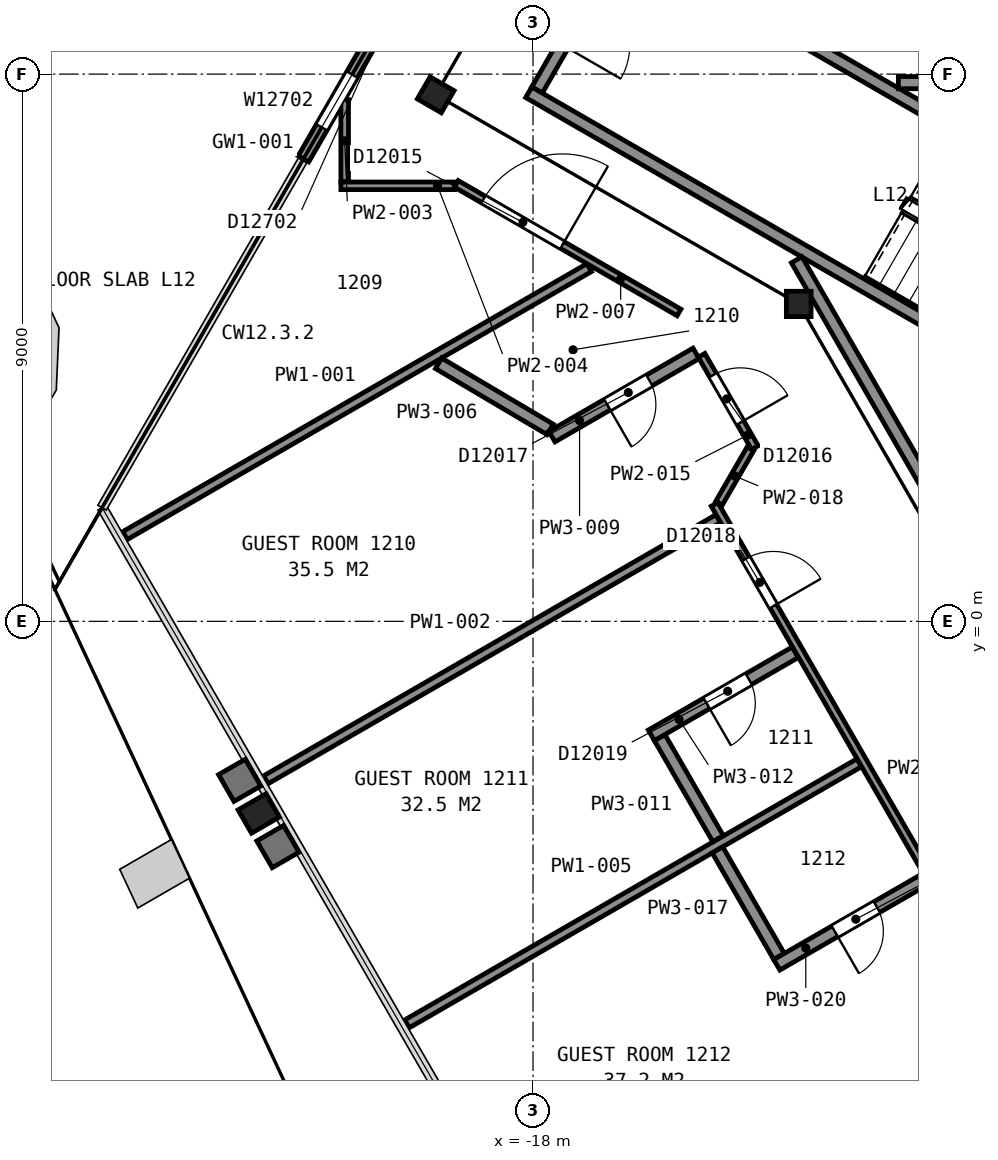
"""IFC4 building model, lengths in metres.
Left out: names, types, materials, properties, quantities, classifications, styles, units other than length and angle.
Written with IfcOpenShell. Run it as: python <this file> out.ifc"""

import sys

from ifc_helpers import new_model, si_unit, direction, frame, frame_2d, origin, origin_2d, place, context, subcontext, project, spatial, rectangle, i_section, extrude, element, fill, save


model = new_model("IFC4")
c1 = context("Model", 3, precision=1e-05, world=origin(), true_north=direction((0.0, 1.0)))
c2 = subcontext(c1, "Body", "Model", "MODEL_VIEW")
j1 = project(units=[si_unit("LENGTHUNIT", "METRE"), si_unit("PLANEANGLEUNIT", "RADIAN")], contexts=[c1])
p1 = place(None, origin())
s1 = spatial("IfcSite", under=j1, at=p1, CompositionType="ELEMENT")
p2 = place(p1, origin())
s2 = spatial("IfcBuilding", under=s1, at=p2, CompositionType="ELEMENT")
p3 = place(p2, frame((0.0, 0.0, 58.4)))
s3 = spatial("IfcBuildingStorey", under=s2, at=p3, CompositionType="ELEMENT", Elevation=58.4)
p4 = place(p3, frame((-22.51, -3.16, 0.0), z_axis=(0.0, 0.0, 1.0), x_axis=(-0.5, 0.866025403784, 0.0)))
e1 = element("IfcColumn", 1, at=p4, inside=s3, PredefinedType="COLUMN", context=c2, shape_type="SweptSolid", body=[
    extrude(i_section(OverallWidth=0.442, OverallDepth=0.531, WebThickness=0.066, FlangeThickness=0.106, FilletRadius=0.015, at=origin_2d()), origin(), (0.0, 0.0, 1.0), 3.575),
])
p5 = place(p3, frame((-19.6, 8.66, 0.0), z_axis=(0.0, 0.0, 1.0), x_axis=(0.5, 0.866025403784, 0.0)))
e2 = element("IfcColumn", 2, at=p5, inside=s3, PredefinedType="COLUMN", context=c2, shape_type="SweptSolid", body=[
    extrude(i_section(OverallWidth=0.419, OverallDepth=0.455, WebThickness=0.042, FlangeThickness=0.068, FilletRadius=0.015, at=origin_2d()), origin(), (0.0, 0.0, 1.0), 3.6),
])
p6 = place(p3, frame((-13.63, 5.22, 0.0), z_axis=(0.0, 0.0, 1.0), x_axis=(1.0, 0.0, 0.0)))
e3 = element("IfcColumn", 3, at=p6, inside=s3, PredefinedType="COLUMN", context=c2, shape_type="SweptSolid", body=[
    extrude(i_section(OverallWidth=0.406, OverallDepth=0.417, WebThickness=0.03, FlangeThickness=0.048, FilletRadius=0.015, at=origin_2d()), origin(), (0.0, 0.0, 1.0), 3.6),
])
p7 = place(p3, frame((-17.475, 15.054, 0.0), z_axis=(0.0, 0.0, 1.0), x_axis=(-0.499973925258, -0.86604045752, 0.0)))
e4 = element("IfcWall", 4, at=p7, inside=s3, PredefinedType="SOLIDWALL", context=c2, shape_type="SweptSolid", body=[
    extrude(rectangle(XDim=8.6, YDim=0.2, at=frame_2d((4.3, 0.0))), origin(), (0.0, 0.0, 1.0), 2.613),
])
p8 = place(p7, frame((0.6, 0.0, 0.9)))
e5 = element("IfcOpeningElement", 5, at=p8, cuts=e4, PredefinedType="OPENING", context=c2, shape_type="SweptSolid", body=[
    extrude(rectangle(XDim=1.0, YDim=1.5, at=frame_2d((0.5, 0.75))), frame((0.0, 0.11, 0.0), z_axis=(0.0, -1.0, 0.0), x_axis=(1.0, 0.0, 0.0)), (0.0, 0.0, 1.0), 0.22),
])
p9 = place(p7, frame((2.2, 0.0, 0.0)))
e6 = element("IfcOpeningElement", 6, at=p9, cuts=e4, PredefinedType="OPENING", context=c2, shape_type="SweptSolid", body=[
    extrude(rectangle(XDim=1.8, YDim=2.4, at=frame_2d((0.9, 1.2))), frame((0.0, 0.11, 0.0), z_axis=(0.0, -1.0, 0.0), x_axis=(1.0, 0.0, 0.0)), (0.0, 0.0, 1.0), 0.22),
])
p10 = place(p7, frame((4.6, 0.0, 0.0)))
e7 = element("IfcOpeningElement", 7, at=p10, cuts=e4, PredefinedType="OPENING", context=c2, shape_type="SweptSolid", body=[
    extrude(rectangle(XDim=1.8, YDim=2.4, at=frame_2d((0.9, 1.2))), frame((0.0, 0.11, 0.0), z_axis=(0.0, -1.0, 0.0), x_axis=(1.0, 0.0, 0.0)), (0.0, 0.0, 1.0), 0.22),
])
p11 = place(p7, frame((7.0, 0.0, 0.9)))
e8 = element("IfcOpeningElement", 8, at=p11, cuts=e4, PredefinedType="OPENING", context=c2, shape_type="SweptSolid", body=[
    extrude(rectangle(XDim=1.0, YDim=1.5, at=frame_2d((0.5, 0.75))), frame((0.0, 0.11, 0.0), z_axis=(0.0, -1.0, 0.0), x_axis=(1.0, 0.0, 0.0)), (0.0, 0.0, 1.0), 0.22),
])
p12 = place(p3, frame((-16.534, 11.162, 0.0), z_axis=(0.0, 0.0, 1.0), x_axis=(-0.49998411664, -0.866034573852, 0.0)))
e9 = element("IfcWall", 9, at=p12, inside=s3, PredefinedType="PARTITIONING", context=c2, shape_type="SweptSolid", body=[
    extrude(rectangle(XDim=2.8, YDim=0.2, at=frame_2d((1.4, 0.0))), origin(), (0.0, 0.0, 1.0), 3.35),
])
p13 = place(p12, frame((0.85, 0.0, 0.0)))
e10 = element("IfcOpeningElement", 10, at=p13, cuts=e9, PredefinedType="OPENING", context=c2, shape_type="SweptSolid", body=[
    extrude(rectangle(XDim=1.1, YDim=2.1, at=frame_2d((0.55, 1.05))), frame((0.0, 0.11, 0.0), z_axis=(0.0, -1.0, 0.0), x_axis=(1.0, 0.0, 0.0)), (0.0, 0.0, 1.0), 0.22),
])
for number, where, z_axis, x_axis in (
    (11, (-7.678, 2.701, 0.0), (0.0, 0.0, 1.0), (-0.866, 0.5, 0.0)),
    (12, (-6.178, 5.299, 0.0), (0.0, 0.0, 1.0), (-0.866, 0.5, 0.0)),
):
    element("IfcWall", number, at=place(p3, frame(where, z_axis=z_axis, x_axis=x_axis)), inside=s3, PredefinedType="PARTITIONING", context=c2, shape_type="SweptSolid", body=[
        extrude(rectangle(XDim=12.0, YDim=0.2, at=frame_2d((6.0, 0.0))), origin(), (0.0, 0.0, 1.0), 3.35),
    ])
p14 = place(p3, frame((-13.664, 5.946, 0.0), z_axis=(0.0, 0.0, 1.0), x_axis=(0.499994327219, -0.866028678941, 0.0)))
e13 = element("IfcWall", 13, at=p14, inside=s3, PredefinedType="PARTITIONING", context=c2, shape_type="SweptSolid", body=[
    extrude(rectangle(XDim=23.968, YDim=0.2, at=frame_2d((11.984, 0.0))), origin(), (0.0, 0.0, 1.0), 3.35),
])
p15 = place(p3, frame((0.263, 8.86, 0.0), z_axis=(0.0, 0.0, 1.0), x_axis=(-1.0, 0.0, 0.0)))
e14 = element("IfcWall", 14, at=p15, inside=s3, PredefinedType="PARTITIONING", context=c2, shape_type="SweptSolid", body=[
    extrude(rectangle(XDim=12.254, YDim=0.2, at=frame_2d((6.127, 0.0))), origin(), (0.0, 0.0, 1.0), 3.35),
])
p16 = place(p15, frame((5.709, 0.0, 0.0)))
e15 = element("IfcOpeningElement", 15, at=p16, cuts=e14, PredefinedType="OPENING", context=c2, shape_type="SweptSolid", body=[
    extrude(rectangle(XDim=1.8, YDim=2.1, at=frame_2d((0.9, 1.05))), frame((0.0, 0.11, 0.0), z_axis=(0.0, -1.0, 0.0), x_axis=(1.0, 0.0, 0.0)), (0.0, 0.0, 1.0), 0.22),
])
p17 = place(p3, frame((-24.71, 1.41, 0.0), z_axis=(0.0, 0.0, 1.0), x_axis=(0.866020465219, 0.500008553748, 0.0)))
e16 = element("IfcWall", 16, at=p17, inside=s3, PredefinedType="PARTITIONING", context=c2, shape_type="SweptSolid", body=[
    extrude(rectangle(XDim=8.815, YDim=0.15, at=frame_2d((4.407, 0.0))), origin(), (0.0, 0.0, 1.0), 2.613),
])
p18 = place(p3, frame((-22.392, -2.605, 0.0), z_axis=(0.0, 0.0, 1.0), x_axis=(0.866031705461, 0.499989085017, 0.0)))
e17 = element("IfcWall", 17, at=p18, inside=s3, PredefinedType="PARTITIONING", context=c2, shape_type="SweptSolid", body=[
    extrude(rectangle(XDim=8.587, YDim=0.15, at=frame_2d((4.293, 0.0))), origin(), (0.0, 0.0, 1.0), 2.613),
])
p19 = place(p3, frame((-21.097, 7.228, 0.0), z_axis=(0.0, 0.0, 1.0), x_axis=(0.0, 1.0, 0.0)))
e18 = element("IfcWall", 18, at=p19, inside=s3, PredefinedType="PARTITIONING", context=c2, shape_type="SweptSolid", body=[
    extrude(rectangle(XDim=1.351, YDim=0.125, at=frame_2d((0.675, 0.0))), origin(), (0.0, 0.0, 1.0), 2.613),
])
p20 = place(p3, frame((-21.159, 7.163, 0.0), z_axis=(0.0, 0.0, 1.0), x_axis=(1.0, 0.0, 0.0)))
e19 = element("IfcWall", 19, at=p20, inside=s3, PredefinedType="PARTITIONING", context=c2, shape_type="SweptSolid", body=[
    extrude(rectangle(XDim=1.868, YDim=0.125, at=frame_2d((0.934, 0.0))), origin(), (0.0, 0.0, 1.0), 2.613),
])
p21 = place(p3, frame((-20.073, -6.621, 0.0), z_axis=(0.0, 0.0, 1.0), x_axis=(0.866029425019, 0.499993034952, 0.0)))
e20 = element("IfcWall", 20, at=p21, inside=s3, PredefinedType="PARTITIONING", context=c2, shape_type="SweptSolid", body=[
    extrude(rectangle(XDim=8.591, YDim=0.15, at=frame_2d((4.296, 0.0))), origin(), (0.0, 0.0, 1.0), 2.613),
])
p22 = place(p3, frame((-19.553, 4.243, 0.0), z_axis=(0.0, 0.0, 1.0), x_axis=(0.860468125465, -0.509504273838, 0.0)))
e21 = element("IfcWall", 21, at=p22, inside=s3, PredefinedType="PARTITIONING", context=c2, shape_type="SweptSolid", body=[
    extrude(rectangle(XDim=2.133, YDim=0.2, at=frame_2d((1.066, 0.0))), origin(), (0.0, 0.0, 1.0), 2.613),
])
p23 = place(p3, frame((-15.599, 5.08, 0.0), z_axis=(0.0, 0.0, 1.0), x_axis=(-0.865948995961, 0.500132318886, 0.0)))
e22 = element("IfcWall", 22, at=p23, inside=s3, PredefinedType="PARTITIONING", context=c2, shape_type="SweptSolid", body=[
    extrude(rectangle(XDim=4.228, YDim=0.125, at=frame_2d((2.114, 0.0))), origin(), (0.0, 0.0, 1.0), 2.613),
])
p24 = place(p23, frame((2.216, 0.0, 0.0)))
e23 = element("IfcOpeningElement", 23, at=p24, cuts=e22, PredefinedType="OPENING", context=c2, shape_type="SweptSolid", body=[
    extrude(rectangle(XDim=1.5, YDim=2.1, at=frame_2d((0.75, 1.05))), frame((0.0, 0.073, 0.0), z_axis=(0.0, -1.0, 0.0), x_axis=(1.0, 0.0, 0.0)), (0.0, 0.0, 1.0), 0.145),
])
p25 = place(p3, frame((-17.689, 3.038, 0.0), z_axis=(0.0, 0.0, 1.0), x_axis=(0.866028150195, 0.499995243048, 0.0)))
e24 = element("IfcWall", 24, at=p25, inside=s3, PredefinedType="PARTITIONING", context=c2, shape_type="SweptSolid", body=[
    extrude(rectangle(XDim=2.737, YDim=0.2, at=frame_2d((1.369, 0.0))), origin(), (0.0, 0.0, 1.0), 2.613),
])
p26 = place(p25, frame((1.05, 0.0, 0.0)))
e25 = element("IfcOpeningElement", 25, at=p26, cuts=e24, PredefinedType="OPENING", context=c2, shape_type="SweptSolid", body=[
    extrude(rectangle(XDim=0.8, YDim=2.1, at=frame_2d((0.4, 1.05))), frame((0.0, 0.11, 0.0), z_axis=(0.0, -1.0, 0.0), x_axis=(1.0, 0.0, 0.0)), (0.0, 0.0, 1.0), 0.22),
])
p27 = place(p3, frame((-17.453, -11.16, 0.0), z_axis=(0.0, 0.0, 1.0), x_axis=(0.866031705461, 0.499989085017, 0.0)))
e26 = element("IfcWall", 26, at=p27, inside=s3, PredefinedType="PARTITIONING", context=c2, shape_type="SweptSolid", body=[
    extrude(rectangle(XDim=8.587, YDim=0.15, at=frame_2d((4.293, 0.0))), origin(), (0.0, 0.0, 1.0), 2.613),
])
p28 = place(p3, frame((-15.917, -1.912, 0.0), z_axis=(0.0, 0.0, 1.0), x_axis=(0.499913221443, -0.866075499611, 0.0)))
e27 = element("IfcWall", 27, at=p28, inside=s3, PredefinedType="PARTITIONING", context=c2, shape_type="SweptSolid", body=[
    extrude(rectangle(XDim=1.92, YDim=0.2, at=frame_2d((0.96, 0.0))), origin(), (0.0, 0.0, 1.0), 2.613),
])
p29 = place(p3, frame((-13.688, -0.509, 0.0), z_axis=(0.0, 0.0, 1.0), x_axis=(-0.866012976267, -0.500021524473, 0.0)))
e28 = element("IfcWall", 28, at=p29, inside=s3, PredefinedType="PARTITIONING", context=c2, shape_type="SweptSolid", body=[
    extrude(rectangle(XDim=2.732, YDim=0.2, at=frame_2d((1.366, 0.0))), origin(), (0.0, 0.0, 1.0), 2.613),
])
p30 = place(p29, frame((0.882, 0.0, 0.0)))
e29 = element("IfcOpeningElement", 29, at=p30, cuts=e28, PredefinedType="OPENING", context=c2, shape_type="SweptSolid", body=[
    extrude(rectangle(XDim=0.8, YDim=2.1, at=frame_2d((0.4, 1.05))), frame((0.0, 0.11, 0.0), z_axis=(0.0, -1.0, 0.0), x_axis=(1.0, 0.0, 0.0)), (0.0, 0.0, 1.0), 0.22),
])
p31 = place(p3, frame((-14.351, 2.856, 0.0), z_axis=(0.0, 0.0, 1.0), x_axis=(-0.500075847163, 0.865981608976, 0.0)))
e30 = element("IfcWall", 30, at=p31, inside=s3, PredefinedType="PARTITIONING", context=c2, shape_type="SweptSolid", body=[
    extrude(rectangle(XDim=1.754, YDim=0.125, at=frame_2d((0.877, 0.0))), origin(), (0.0, 0.0, 1.0), 2.613),
])
p32 = place(p31, frame((0.477, 0.0, 0.0)))
e31 = element("IfcOpeningElement", 31, at=p32, cuts=e30, PredefinedType="OPENING", context=c2, shape_type="SweptSolid", body=[
    extrude(rectangle(XDim=0.9, YDim=2.1, at=frame_2d((0.45, 1.05))), frame((0.0, 0.073, 0.0), z_axis=(0.0, -1.0, 0.0), x_axis=(1.0, 0.0, 0.0)), (0.0, 0.0, 1.0), 0.145),
])
p33 = place(p3, frame((-14.967, -3.759, 0.0), z_axis=(0.0, 0.0, 1.0), x_axis=(0.500042536776, -0.866000843773, 0.0)))
e32 = element("IfcWall", 32, at=p33, inside=s3, PredefinedType="PARTITIONING", context=c2, shape_type="SweptSolid", body=[
    extrude(rectangle(XDim=2.025, YDim=0.2, at=frame_2d((1.012, 0.0))), origin(), (0.0, 0.0, 1.0), 2.613),
])
p34 = place(p3, frame((-14.94, 1.944, 0.0), z_axis=(0.0, 0.0, 1.0), x_axis=(0.500289431813, 0.86585823575, 0.0)))
e33 = element("IfcWall", 33, at=p34, inside=s3, PredefinedType="PARTITIONING", context=c2, shape_type="SweptSolid", body=[
    extrude(rectangle(XDim=1.031, YDim=0.125, at=frame_2d((0.516, 0.0))), origin(), (0.0, 0.0, 1.0), 2.613),
])
p35 = place(p3, frame((-3.766, -17.558, 0.0), z_axis=(0.0, 0.0, 1.0), x_axis=(-0.500008349927, 0.866020582898, 0.0)))
e34 = element("IfcWall", 34, at=p35, inside=s3, PredefinedType="PARTITIONING", context=c2, shape_type="SweptSolid", body=[
    extrude(rectangle(XDim=22.496, YDim=0.125, at=frame_2d((11.248, 0.0))), origin(), (0.0, 0.0, 1.0), 2.613),
])
p36 = place(p35, frame((20.563, 0.0, 0.0)))
e35 = element("IfcOpeningElement", 35, at=p36, cuts=e34, PredefinedType="OPENING", context=c2, shape_type="SweptSolid", body=[
    extrude(rectangle(XDim=0.9, YDim=2.1, at=frame_2d((0.45, 1.05))), frame((0.0, 0.073, 0.0), z_axis=(0.0, -1.0, 0.0), x_axis=(1.0, 0.0, 0.0)), (0.0, 0.0, 1.0), 0.145),
])
p37 = place(p35, frame((13.476, 0.0, 0.0)))
e36 = element("IfcOpeningElement", 36, at=p37, cuts=e34, PredefinedType="OPENING", context=c2, shape_type="SweptSolid", body=[
    extrude(rectangle(XDim=0.9, YDim=2.1, at=frame_2d((0.45, 1.05))), frame((0.0, 0.073, 0.0), z_axis=(0.0, -1.0, 0.0), x_axis=(1.0, 0.0, 0.0)), (0.0, 0.0, 1.0), 0.145),
])
p38 = place(p35, frame((10.684, 0.0, 0.0)))
e37 = element("IfcOpeningElement", 37, at=p38, cuts=e34, PredefinedType="OPENING", context=c2, shape_type="SweptSolid", body=[
    extrude(rectangle(XDim=0.9, YDim=2.1, at=frame_2d((0.45, 1.05))), frame((0.0, 0.073, 0.0), z_axis=(0.0, -1.0, 0.0), x_axis=(1.0, 0.0, 0.0)), (0.0, 0.0, 1.0), 0.145),
])
p39 = place(p35, frame((3.948, 0.0, 0.0)))
e38 = element("IfcOpeningElement", 38, at=p39, cuts=e34, PredefinedType="OPENING", context=c2, shape_type="SweptSolid", body=[
    extrude(rectangle(XDim=0.9, YDim=2.1, at=frame_2d((0.45, 1.05))), frame((0.0, 0.073, 0.0), z_axis=(0.0, -1.0, 0.0), x_axis=(1.0, 0.0, 0.0)), (0.0, 0.0, 1.0), 0.145),
])
p40 = place(p35, frame((1.411, 0.0, 0.0)))
e39 = element("IfcOpeningElement", 39, at=p40, cuts=e34, PredefinedType="OPENING", context=c2, shape_type="SweptSolid", body=[
    extrude(rectangle(XDim=0.9, YDim=2.1, at=frame_2d((0.45, 1.05))), frame((0.0, 0.073, 0.0), z_axis=(0.0, -1.0, 0.0), x_axis=(1.0, 0.0, 0.0)), (0.0, 0.0, 1.0), 0.145),
])
p41 = place(p3, frame((-13.991, -5.649, 0.0), z_axis=(0.0, 0.0, 1.0), x_axis=(0.866048046904, 0.499960778915, 0.0)))
e40 = element("IfcWall", 40, at=p41, inside=s3, PredefinedType="PARTITIONING", context=c2, shape_type="SweptSolid", body=[
    extrude(rectangle(XDim=2.838, YDim=0.2, at=frame_2d((1.419, 0.0))), origin(), (0.0, 0.0, 1.0), 2.613),
])
p42 = place(p41, frame((1.1, 0.0, 0.0)))
e41 = element("IfcOpeningElement", 41, at=p42, cuts=e40, PredefinedType="OPENING", context=c2, shape_type="SweptSolid", body=[
    extrude(rectangle(XDim=0.8, YDim=2.1, at=frame_2d((0.4, 1.05))), frame((0.0, 0.11, 0.0), z_axis=(0.0, -1.0, 0.0), x_axis=(1.0, 0.0, 0.0)), (0.0, 0.0, 1.0), 0.22),
])
p43 = place(p11, origin())
e42 = element("IfcWindow", 42, at=p43, inside=s3, PartitioningType="SINGLE_PANEL", PredefinedType="WINDOW", context=c2, shape_type="SweptSolid", body=[
    extrude(rectangle(XDim=1.0, YDim=1.5, at=frame_2d((0.5, 0.75))), frame((0.0, 0.03, 0.0), z_axis=(0.0, -1.0, 0.0), x_axis=(1.0, 0.0, 0.0)), (0.0, 0.0, 1.0), 0.06),
])
fill(e8, e42)
p44 = place(p24, origin())
e43 = element("IfcDoor", 43, at=p44, inside=s3, OperationType="DOUBLE_DOOR_SINGLE_SWING", PredefinedType="DOOR", context=c2, shape_type="SweptSolid", body=[
    extrude(rectangle(XDim=1.5, YDim=2.1, at=frame_2d((0.75, 1.05))), frame((0.0, 0.025, 0.0), z_axis=(0.0, -1.0, 0.0), x_axis=(1.0, 0.0, 0.0)), (0.0, 0.0, 1.0), 0.05),
])
fill(e23, e43)
p45 = place(p26, origin())
e44 = element("IfcDoor", 44, at=p45, inside=s3, OperationType="SINGLE_SWING_LEFT", PredefinedType="DOOR", context=c2, shape_type="SweptSolid", body=[
    extrude(rectangle(XDim=0.8, YDim=2.1, at=frame_2d((0.4, 1.05))), frame((0.0, 0.025, 0.0), z_axis=(0.0, -1.0, 0.0), x_axis=(1.0, 0.0, 0.0)), (0.0, 0.0, 1.0), 0.05),
])
fill(e25, e44)
p46 = place(p30, origin())
e45 = element("IfcDoor", 45, at=p46, inside=s3, OperationType="SINGLE_SWING_RIGHT", PredefinedType="DOOR", context=c2, shape_type="SweptSolid", body=[
    extrude(rectangle(XDim=0.8, YDim=2.1, at=frame_2d((0.4, 1.05))), frame((0.0, 0.025, 0.0), z_axis=(0.0, -1.0, 0.0), x_axis=(1.0, 0.0, 0.0)), (0.0, 0.0, 1.0), 0.05),
])
fill(e29, e45)
p47 = place(p32, origin())
e46 = element("IfcDoor", 46, at=p47, inside=s3, OperationType="SINGLE_SWING_LEFT", PredefinedType="DOOR", context=c2, shape_type="SweptSolid", body=[
    extrude(rectangle(XDim=0.9, YDim=2.1, at=frame_2d((0.45, 1.05))), frame((0.0, 0.025, 0.0), z_axis=(0.0, -1.0, 0.0), x_axis=(1.0, 0.0, 0.0)), (0.0, 0.0, 1.0), 0.05),
])
fill(e31, e46)
p48 = place(p36, origin())
e47 = element("IfcDoor", 47, at=p48, inside=s3, OperationType="SINGLE_SWING_LEFT", PredefinedType="DOOR", context=c2, shape_type="SweptSolid", body=[
    extrude(rectangle(XDim=0.9, YDim=2.1, at=frame_2d((0.45, 1.05))), frame((0.0, 0.025, 0.0), z_axis=(0.0, -1.0, 0.0), x_axis=(1.0, 0.0, 0.0)), (0.0, 0.0, 1.0), 0.05),
])
fill(e35, e47)
p49 = place(p42, origin())
e48 = element("IfcDoor", 48, at=p49, inside=s3, OperationType="SINGLE_SWING_LEFT", PredefinedType="DOOR", context=c2, shape_type="SweptSolid", body=[
    extrude(rectangle(XDim=0.8, YDim=2.1, at=frame_2d((0.4, 1.05))), frame((0.0, 0.025, 0.0), z_axis=(0.0, -1.0, 0.0), x_axis=(1.0, 0.0, 0.0)), (0.0, 0.0, 1.0), 0.05),
])
fill(e41, e48)
save(model, sys.argv[1])
